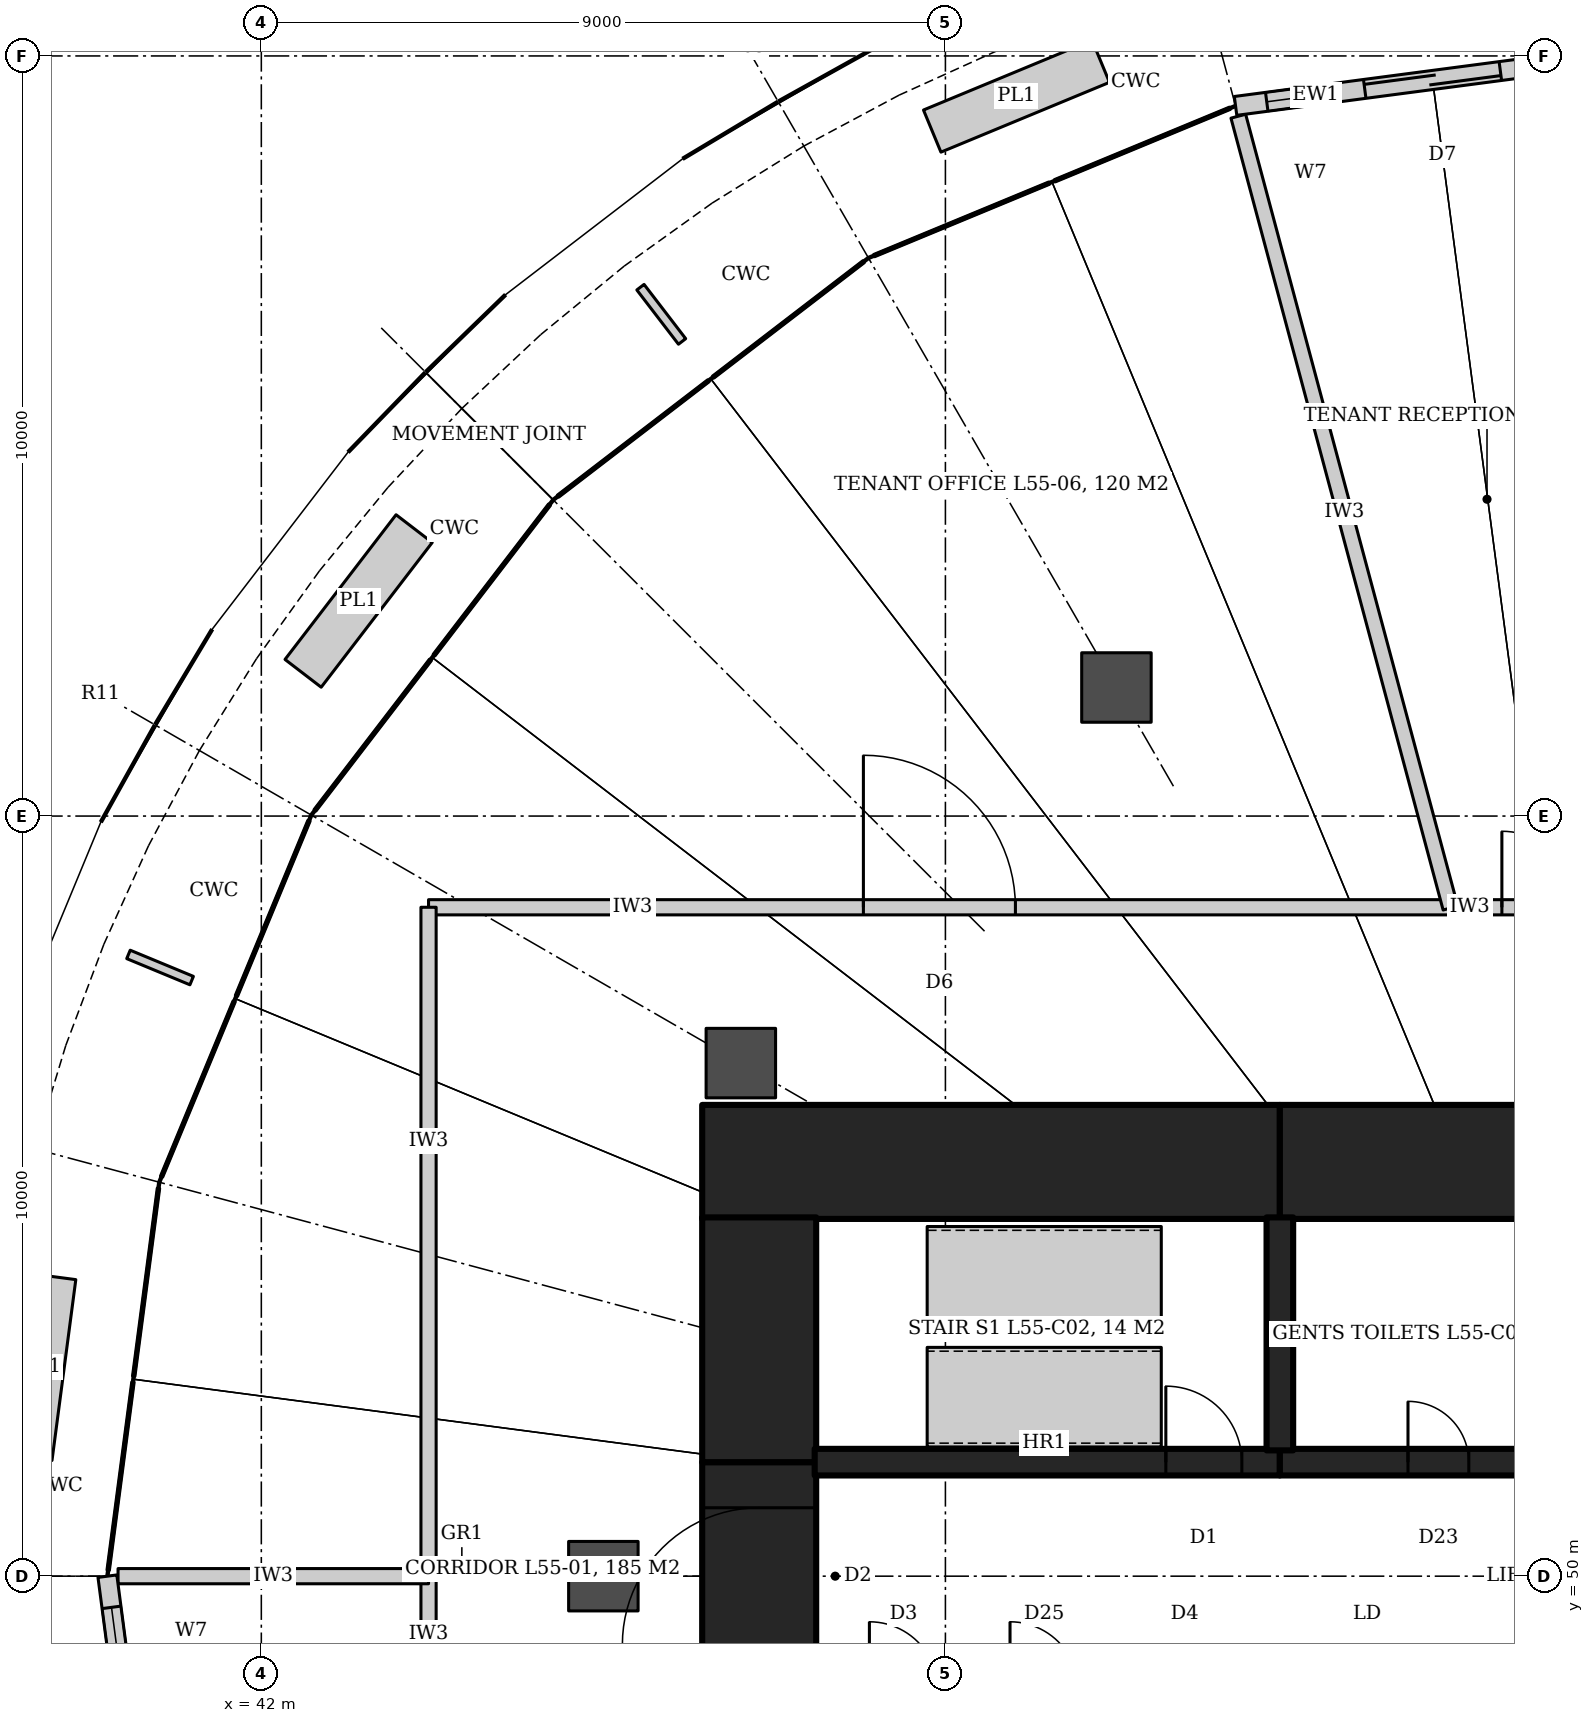
"""IFC4 building model, lengths in metres.
Left out: names, types, materials, properties, quantities, classifications, styles, units other than length and angle.
Written with IfcOpenShell. Run it as: python <this file> out.ifc"""

import sys

from ifc_helpers import new_model, si_unit, direction, frame, frame_2d, origin, origin_2d, place, context, subcontext, project, spatial, rectangle, hollow_circle, extrude, element, fill, save


model = new_model("IFC4")
c1 = context("Model", 3, precision=1e-05, world=origin(), true_north=direction((0.0, 1.0)))
c2 = subcontext(c1, "Body", "Model", "MODEL_VIEW")
j1 = project(units=[si_unit("LENGTHUNIT", "METRE"), si_unit("PLANEANGLEUNIT", "RADIAN")], contexts=[c1])
p1 = place(None, origin())
s1 = spatial("IfcSite", under=j1, at=p1, CompositionType="ELEMENT")
p2 = place(p1, origin())
s2 = spatial("IfcBuilding", under=s1, at=p2, CompositionType="ELEMENT")
p3 = place(p2, frame((0.0, 0.0, 240.2)))
s3 = spatial("IfcBuildingStorey", under=s2, at=p3, CompositionType="ELEMENT", Elevation=240.2)
p4 = place(p3, frame((47.8, 55.45, 0.0), z_axis=(0.0, 0.0, 1.0), x_axis=(1.0, 0.0, 0.0)))
e1 = element("IfcWall", 1, at=p4, inside=s3, PredefinedType="SHEAR", context=c2, shape_type="SweptSolid", body=[
    extrude(rectangle(XDim=7.6, YDim=1.5, at=frame_2d((3.8, 0.0))), origin(), (0.0, 0.0, 1.0), 4.2),
])
p5 = place(p3, frame((55.4, 55.45, 0.0), z_axis=(0.0, 0.0, 1.0), x_axis=(1.0, 0.0, 0.0)))
e2 = element("IfcWall", 2, at=p5, inside=s3, PredefinedType="SHEAR", context=c2, shape_type="SweptSolid", body=[
    extrude(rectangle(XDim=9.2, YDim=1.5, at=frame_2d((4.6, 0.0))), origin(), (0.0, 0.0, 1.0), 4.2),
])
p6 = place(p3, frame((48.55, 48.5, 0.0), z_axis=(0.0, 0.0, 1.0), x_axis=(0.0, 1.0, 0.0)))
e3 = element("IfcWall", 3, at=p6, inside=s3, PredefinedType="SHEAR", context=c2, shape_type="SweptSolid", body=[
    extrude(rectangle(XDim=3.0, YDim=1.5, at=frame_2d((1.5, 0.0))), origin(), (0.0, 0.0, 1.0), 4.2),
])
p7 = place(p6, frame((0.6, 0.0, 0.0)))
e4 = element("IfcOpeningElement", 4, at=p7, cuts=e3, PredefinedType="OPENING", context=c2, shape_type="SweptSolid", body=[
    extrude(rectangle(XDim=1.8, YDim=2.1, at=frame_2d((0.9, 1.05))), frame((0.0, 0.76, 0.0), z_axis=(0.0, -1.0, 0.0), x_axis=(1.0, 0.0, 0.0)), (0.0, 0.0, 1.0), 1.52),
])
p8 = place(p3, frame((48.55, 51.5, 0.0), z_axis=(0.0, 0.0, 1.0), x_axis=(0.0, 1.0, 0.0)))
e5 = element("IfcWall", 5, at=p8, inside=s3, PredefinedType="SHEAR", context=c2, shape_type="SweptSolid", body=[
    extrude(rectangle(XDim=3.22, YDim=1.5, at=frame_2d((1.61, 0.0))), origin(), (0.0, 0.0, 1.0), 4.2),
])
p9 = place(p3, frame((49.28, 51.5, 0.0), z_axis=(0.0, 0.0, 1.0), x_axis=(1.0, 0.0, 0.0)))
e6 = element("IfcWall", 6, at=p9, inside=s3, PredefinedType="SHEAR", context=c2, shape_type="SweptSolid", body=[
    extrude(rectangle(XDim=6.12, YDim=0.35, at=frame_2d((3.06, 0.0))), origin(), (0.0, 0.0, 1.0), 4.2),
])
p10 = place(p9, frame((4.62, 0.0, 0.0)))
e7 = element("IfcOpeningElement", 7, at=p10, cuts=e6, PredefinedType="OPENING", context=c2, shape_type="SweptSolid", body=[
    extrude(rectangle(XDim=1.0, YDim=2.1, at=frame_2d((0.5, 1.05))), frame((0.0, 0.185, 0.0), z_axis=(0.0, -1.0, 0.0), x_axis=(1.0, 0.0, 0.0)), (0.0, 0.0, 1.0), 0.37),
])
p11 = place(p3, frame((55.4, 51.5, 0.0), z_axis=(0.0, 0.0, 1.0), x_axis=(1.0, 0.0, 0.0)))
e8 = element("IfcWall", 8, at=p11, inside=s3, PredefinedType="SHEAR", context=c2, shape_type="SweptSolid", body=[
    extrude(rectangle(XDim=9.2, YDim=0.35, at=frame_2d((4.6, 0.0))), origin(), (0.0, 0.0, 1.0), 4.2),
])
p12 = place(p11, frame((1.686, 0.0, 0.0)))
e9 = element("IfcOpeningElement", 9, at=p12, cuts=e8, PredefinedType="OPENING", context=c2, shape_type="SweptSolid", body=[
    extrude(rectangle(XDim=0.8, YDim=2.1, at=frame_2d((0.4, 1.05))), frame((0.0, 0.185, 0.0), z_axis=(0.0, -1.0, 0.0), x_axis=(1.0, 0.0, 0.0)), (0.0, 0.0, 1.0), 0.37),
])
p13 = place(p11, frame((4.854, 0.0, 0.0)))
e10 = element("IfcOpeningElement", 10, at=p13, cuts=e8, PredefinedType="OPENING", context=c2, shape_type="SweptSolid", body=[
    extrude(rectangle(XDim=0.8, YDim=2.1, at=frame_2d((0.4, 1.05))), frame((0.0, 0.185, 0.0), z_axis=(0.0, -1.0, 0.0), x_axis=(1.0, 0.0, 0.0)), (0.0, 0.0, 1.0), 0.37),
])
p14 = place(p11, frame((7.368, 0.0, 0.0)))
e11 = element("IfcOpeningElement", 11, at=p14, cuts=e8, PredefinedType="OPENING", context=c2, shape_type="SweptSolid", body=[
    extrude(rectangle(XDim=0.8, YDim=2.1, at=frame_2d((0.4, 1.05))), frame((0.0, 0.185, 0.0), z_axis=(0.0, -1.0, 0.0), x_axis=(1.0, 0.0, 0.0)), (0.0, 0.0, 1.0), 0.37),
])
p15 = place(p3, frame((55.4, 51.655, 0.0), z_axis=(0.0, 0.0, 1.0), x_axis=(0.0, 1.0, 0.0)))
e12 = element("IfcWall", 12, at=p15, inside=s3, PredefinedType="SHEAR", context=c2, shape_type="SweptSolid", body=[
    extrude(rectangle(XDim=3.065, YDim=0.35, at=frame_2d((1.532, 0.0))), origin(), (0.0, 0.0, 1.0), 4.2),
])
for number, where, z_axis, x_axis in (
    (13, (53.25, 61.691, 0.0), (0.0, 0.0, 1.0), (1.0, 0.0, 0.0)),
    (14, (48.309, 56.75, 0.0), (0.0, 0.0, 1.0), (1.0, 0.0, 0.0)),
    (15, (46.5, 50.0, 0.0), (0.0, 0.0, 1.0), (1.0, 0.0, 0.0)),
):
    element("IfcColumn", number, at=place(p3, frame(where, z_axis=z_axis, x_axis=x_axis)), inside=s3, PredefinedType="COLUMN", context=c2, shape_type="SweptSolid", body=[
        extrude(hollow_circle(Radius=0.457, WallThickness=0.045, at=origin_2d()), origin(), (0.0, 0.0, 1.0), 4.2),
    ])
p16 = place(p3, frame((44.2, 58.8, 0.0), z_axis=(0.0, 0.0, 1.0), x_axis=(1.0, 0.0, 0.0)))
e16 = element("IfcWall", 16, at=p16, inside=s3, PredefinedType="PARTITIONING", context=c2, shape_type="SweptSolid", body=[
    extrude(rectangle(XDim=13.442, YDim=0.2, at=frame_2d((6.721, 0.0))), origin(), (0.0, 0.0, 1.0), 3.02),
])
p17 = place(p16, frame((5.721, 0.0, 0.0)))
e17 = element("IfcOpeningElement", 17, at=p17, cuts=e16, PredefinedType="OPENING", context=c2, shape_type="SweptSolid", body=[
    extrude(rectangle(XDim=2.0, YDim=2.1, at=frame_2d((1.0, 1.05))), frame((0.0, 0.11, 0.0), z_axis=(0.0, -1.0, 0.0), x_axis=(1.0, 0.0, 0.0)), (0.0, 0.0, 1.0), 0.22),
])
p18 = place(p3, frame((57.642, 58.8, 0.0), z_axis=(0.0, 0.0, 1.0), x_axis=(1.0, 0.0, 0.0)))
e18 = element("IfcWall", 18, at=p18, inside=s3, PredefinedType="PARTITIONING", context=c2, shape_type="SweptSolid", body=[
    extrude(rectangle(XDim=2.358, YDim=0.2, at=frame_2d((1.179, 0.0))), origin(), (0.0, 0.0, 1.0), 3.04),
])
p19 = place(p18, frame((0.679, 0.0, 0.0)))
e19 = element("IfcOpeningElement", 19, at=p19, cuts=e18, PredefinedType="OPENING", context=c2, shape_type="SweptSolid", body=[
    extrude(rectangle(XDim=1.0, YDim=2.1, at=frame_2d((0.5, 1.05))), frame((0.0, 0.11, 0.0), z_axis=(0.0, -1.0, 0.0), x_axis=(1.0, 0.0, 0.0)), (0.0, 0.0, 1.0), 0.22),
])
p20 = place(p3, frame((44.2, 45.766, 0.0), z_axis=(0.0, 0.0, 1.0), x_axis=(0.0, 1.0, 0.0)))
e20 = element("IfcWall", 20, at=p20, inside=s3, PredefinedType="PARTITIONING", context=c2, shape_type="SweptSolid", body=[
    extrude(rectangle(XDim=4.234, YDim=0.2, at=frame_2d((2.117, 0.0))), origin(), (0.0, 0.0, 1.0), 3.02),
])
p21 = place(p20, frame((1.317, 0.0, 0.0)))
e21 = element("IfcOpeningElement", 21, at=p21, cuts=e20, PredefinedType="OPENING", context=c2, shape_type="SweptSolid", body=[
    extrude(rectangle(XDim=1.6, YDim=2.4, at=frame_2d((0.8, 1.2))), frame((0.0, 0.11, 0.0), z_axis=(0.0, -1.0, 0.0), x_axis=(1.0, 0.0, 0.0)), (0.0, 0.0, 1.0), 0.22),
])
p22 = place(p3, frame((44.2, 50.0, 0.0), z_axis=(0.0, 0.0, 1.0), x_axis=(0.0, 1.0, 0.0)))
e22 = element("IfcWall", 22, at=p22, inside=s3, PredefinedType="PARTITIONING", context=c2, shape_type="SweptSolid", body=[
    extrude(rectangle(XDim=8.8, YDim=0.2, at=frame_2d((4.4, 0.0))), origin(), (0.0, 0.0, 1.0), 3.02),
])
p23 = place(p3, frame((57.645, 58.79, 0.0), z_axis=(0.0, 0.0, 1.0), x_axis=(-0.25880510588, 0.965929561185, 0.0)))
e23 = element("IfcWall", 23, at=p23, inside=s3, PredefinedType="PARTITIONING", context=c2, shape_type="SweptSolid", body=[
    extrude(rectangle(XDim=10.785, YDim=0.2, at=frame_2d((5.393, 0.0))), origin(), (0.0, 0.0, 1.0), 3.02),
])
p24 = place(p3, frame((44.2, 50.0, 0.0), z_axis=(0.0, 0.0, 1.0), x_axis=(-1.0, 0.0, 0.0)))
e24 = element("IfcWall", 24, at=p24, inside=s3, PredefinedType="PARTITIONING", context=c2, shape_type="SweptSolid", body=[
    extrude(rectangle(XDim=4.085, YDim=0.2, at=frame_2d((2.042, 0.0))), origin(), (0.0, 0.0, 1.0), 3.02),
])
p25 = place(p3, frame((60.0, 70.025, 0.0), z_axis=(0.0, 0.0, 1.0), x_axis=(-0.99145000307, -0.130487131216, 0.0)))
e25 = element("IfcWall", 25, at=p25, inside=s3, PredefinedType="SOLIDWALL", context=c2, shape_type="SweptSolid", body=[
    extrude(rectangle(XDim=5.228, YDim=0.25, at=frame_2d((2.614, 0.0))), origin(), (0.0, 0.0, 1.0), 4.04),
])
p26 = place(p25, frame((1.714, 0.0, 0.0)))
e26 = element("IfcOpeningElement", 26, at=p26, cuts=e25, PredefinedType="OPENING", context=c2, shape_type="SweptSolid", body=[
    extrude(rectangle(XDim=1.8, YDim=2.4, at=frame_2d((0.9, 1.2))), frame((0.0, 0.135, 0.0), z_axis=(0.0, -1.0, 0.0), x_axis=(1.0, 0.0, 0.0)), (0.0, 0.0, 1.0), 0.27),
])
p27 = place(p25, frame((0.414, 0.0, 0.0)))
e27 = element("IfcOpeningElement", 27, at=p27, cuts=e25, PredefinedType="OPENING", context=c2, shape_type="SweptSolid", body=[
    extrude(rectangle(XDim=0.9, YDim=2.4, at=frame_2d((0.45, 1.2))), frame((0.0, 0.135, 0.0), z_axis=(0.0, -1.0, 0.0), x_axis=(1.0, 0.0, 0.0)), (0.0, 0.0, 1.0), 0.27),
])
p28 = place(p25, frame((3.914, 0.0, 0.0)))
e28 = element("IfcOpeningElement", 28, at=p28, cuts=e25, PredefinedType="OPENING", context=c2, shape_type="SweptSolid", body=[
    extrude(rectangle(XDim=0.9, YDim=2.4, at=frame_2d((0.45, 1.2))), frame((0.0, 0.135, 0.0), z_axis=(0.0, -1.0, 0.0), x_axis=(1.0, 0.0, 0.0)), (0.0, 0.0, 1.0), 0.27),
])
p29 = place(p3, frame((39.975, 50.0, 0.0), z_axis=(0.0, 0.0, 1.0), x_axis=(0.130487131216, -0.99145000307, 0.0)))
e29 = element("IfcWall", 29, at=p29, inside=s3, PredefinedType="SOLIDWALL", context=c2, shape_type="SweptSolid", body=[
    extrude(rectangle(XDim=5.228, YDim=0.25, at=frame_2d((2.614, 0.0))), origin(), (0.0, 0.0, 1.0), 4.04),
])
p30 = place(p29, frame((1.714, 0.0, 0.0)))
e30 = element("IfcOpeningElement", 30, at=p30, cuts=e29, PredefinedType="OPENING", context=c2, shape_type="SweptSolid", body=[
    extrude(rectangle(XDim=1.8, YDim=2.4, at=frame_2d((0.9, 1.2))), frame((0.0, 0.135, 0.0), z_axis=(0.0, -1.0, 0.0), x_axis=(1.0, 0.0, 0.0)), (0.0, 0.0, 1.0), 0.27),
])
p31 = place(p29, frame((0.414, 0.0, 0.0)))
e31 = element("IfcOpeningElement", 31, at=p31, cuts=e29, PredefinedType="OPENING", context=c2, shape_type="SweptSolid", body=[
    extrude(rectangle(XDim=0.9, YDim=2.4, at=frame_2d((0.45, 1.2))), frame((0.0, 0.135, 0.0), z_axis=(0.0, -1.0, 0.0), x_axis=(1.0, 0.0, 0.0)), (0.0, 0.0, 1.0), 0.27),
])
p32 = place(p29, frame((3.914, 0.0, 0.0)))
e32 = element("IfcOpeningElement", 32, at=p32, cuts=e29, PredefinedType="OPENING", context=c2, shape_type="SweptSolid", body=[
    extrude(rectangle(XDim=0.9, YDim=2.4, at=frame_2d((0.45, 1.2))), frame((0.0, 0.135, 0.0), z_axis=(0.0, -1.0, 0.0), x_axis=(1.0, 0.0, 0.0)), (0.0, 0.0, 1.0), 0.27),
])
p33 = place(p19, origin())
e33 = element("IfcDoor", 33, at=p33, inside=s3, OperationType="SINGLE_SWING_LEFT", PredefinedType="DOOR", context=c2, shape_type="SweptSolid", body=[
    extrude(rectangle(XDim=1.0, YDim=2.1, at=frame_2d((0.5, 1.05))), frame((0.0, 0.025, 0.0), z_axis=(0.0, -1.0, 0.0), x_axis=(1.0, 0.0, 0.0)), (0.0, 0.0, 1.0), 0.05),
])
fill(e19, e33)
p34 = place(p17, origin())
e34 = element("IfcDoor", 34, at=p34, inside=s3, OperationType="DOUBLE_DOOR_DOUBLE_SWING", PredefinedType="DOOR", context=c2, shape_type="SweptSolid", body=[
    extrude(rectangle(XDim=2.0, YDim=2.1, at=frame_2d((1.0, 1.05))), frame((0.0, 0.025, 0.0), z_axis=(0.0, -1.0, 0.0), x_axis=(1.0, 0.0, 0.0)), (0.0, 0.0, 1.0), 0.05),
])
fill(e17, e34)
p35 = place(p26, origin())
e35 = element("IfcDoor", 35, at=p35, inside=s3, OperationType="DOUBLE_DOOR_SLIDING", PredefinedType="DOOR", context=c2, shape_type="SweptSolid", body=[
    extrude(rectangle(XDim=1.8, YDim=2.4, at=frame_2d((0.9, 1.2))), frame((0.0, 0.025, 0.0), z_axis=(0.0, -1.0, 0.0), x_axis=(1.0, 0.0, 0.0)), (0.0, 0.0, 1.0), 0.05),
])
fill(e26, e35)
p36 = place(p28, origin())
e36 = element("IfcWindow", 36, at=p36, inside=s3, PartitioningType="SINGLE_PANEL", PredefinedType="WINDOW", context=c2, shape_type="SweptSolid", body=[
    extrude(rectangle(XDim=0.9, YDim=2.4, at=frame_2d((0.45, 1.2))), frame((0.0, 0.03, 0.0), z_axis=(0.0, -1.0, 0.0), x_axis=(1.0, 0.0, 0.0)), (0.0, 0.0, 1.0), 0.06),
])
fill(e28, e36)
p37 = place(p31, origin())
e37 = element("IfcWindow", 37, at=p37, inside=s3, PartitioningType="SINGLE_PANEL", PredefinedType="WINDOW", context=c2, shape_type="SweptSolid", body=[
    extrude(rectangle(XDim=0.9, YDim=2.4, at=frame_2d((0.45, 1.2))), frame((0.0, 0.03, 0.0), z_axis=(0.0, -1.0, 0.0), x_axis=(1.0, 0.0, 0.0)), (0.0, 0.0, 1.0), 0.06),
])
fill(e31, e37)
p38 = place(p10, origin())
e38 = element("IfcDoor", 38, at=p38, inside=s3, OperationType="SINGLE_SWING_LEFT", PredefinedType="DOOR", context=c2, shape_type="SweptSolid", body=[
    extrude(rectangle(XDim=1.0, YDim=2.1, at=frame_2d((0.5, 1.05))), frame((0.0, 0.025, 0.0), z_axis=(0.0, -1.0, 0.0), x_axis=(1.0, 0.0, 0.0)), (0.0, 0.0, 1.0), 0.05),
])
fill(e7, e38)
p39 = place(p7, origin())
e39 = element("IfcDoor", 39, at=p39, inside=s3, OperationType="DOUBLE_DOOR_DOUBLE_SWING", PredefinedType="DOOR", context=c2, shape_type="SweptSolid", body=[
    extrude(rectangle(XDim=1.8, YDim=2.1, at=frame_2d((0.9, 1.05))), frame((0.0, 0.025, 0.0), z_axis=(0.0, -1.0, 0.0), x_axis=(1.0, 0.0, 0.0)), (0.0, 0.0, 1.0), 0.05),
])
fill(e4, e39)
p40 = place(p12, origin())
e40 = element("IfcDoor", 40, at=p40, inside=s3, OperationType="SINGLE_SWING_LEFT", PredefinedType="DOOR", context=c2, shape_type="SweptSolid", body=[
    extrude(rectangle(XDim=0.8, YDim=2.1, at=frame_2d((0.4, 1.05))), frame((0.0, 0.025, 0.0), z_axis=(0.0, -1.0, 0.0), x_axis=(1.0, 0.0, 0.0)), (0.0, 0.0, 1.0), 0.05),
])
fill(e9, e40)
save(model, sys.argv[1])
